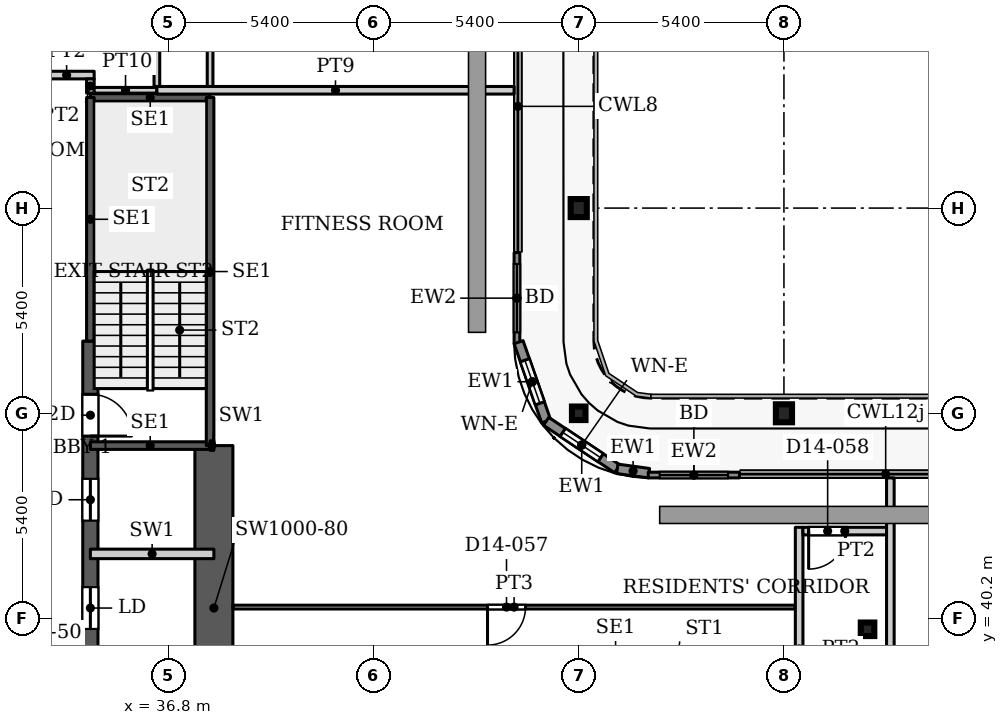
"""IFC4 building model, lengths in metres.
Left out: names, types, materials, properties, quantities, classifications, styles, units other than length and angle.
Written with IfcOpenShell. Run it as: python <this file> out.ifc"""

import sys

from ifc_helpers import new_model, si_unit, direction, frame, frame_2d, origin, origin_2d, place, context, subcontext, project, spatial, rectangle, hollow_rectangle, i_section, extrude, source, transform, mapped, element, fill, save


model = new_model("IFC4")
c1 = context("Model", 3, precision=1e-05, world=origin(), true_north=direction((0.0, 1.0)))
c2 = subcontext(c1, "Body", "Model", "MODEL_VIEW")
j1 = project(units=[si_unit("LENGTHUNIT", "METRE"), si_unit("PLANEANGLEUNIT", "RADIAN")], contexts=[c1])
p1 = place(None, origin())
s1 = spatial("IfcSite", under=j1, at=p1, CompositionType="ELEMENT")
p2 = place(p1, origin())
s2 = spatial("IfcBuilding", under=s1, at=p2, CompositionType="ELEMENT")
p3 = place(p2, frame((0.0, 0.0, 65.6)))
s3 = spatial("IfcBuildingStorey", under=s2, at=p3, CompositionType="ELEMENT", Elevation=65.6)
for number, where, z_axis, x_axis in (
    (1, (53.0, 45.6, 0.0), (0.0, 0.0, 1.0), (1.0, 0.0, 0.0)),
    (2, (47.6, 51.0, 0.0), (0.0, 0.0, 1.0), (1.0, 0.0, 0.0)),
):
    element("IfcColumn", number, at=place(p3, frame(where, z_axis=z_axis, x_axis=x_axis)), inside=s3, PredefinedType="COLUMN", context=c2, shape_type="SweptSolid", body=[
        extrude(i_section(OverallWidth=0.424, OverallDepth=0.474, WebThickness=0.048, FlangeThickness=0.077, FilletRadius=0.014, at=origin_2d()), origin(), (0.0, 0.0, 1.0), 3.9),
    ])
for number, where, z_axis, x_axis in (
    (3, (55.2, 39.916, 0.0), (0.0, 0.0, 1.0), (1.0, 0.0, 0.0)),
    (4, (47.6, 45.6, 0.0), (0.0, 0.0, 1.0), (1.0, 0.0, 0.0)),
):
    element("IfcColumn", number, at=place(p3, frame(where, z_axis=z_axis, x_axis=x_axis)), inside=s3, PredefinedType="COLUMN", context=c2, shape_type="SweptSolid", body=[
        extrude(hollow_rectangle(XDim=0.356, YDim=0.356, WallThickness=0.016, InnerFilletRadius=0.016, OuterFilletRadius=0.032, at=origin_2d()), origin(), (0.0, 0.0, 1.0), 3.9),
    ])
p4 = place(p3, frame((34.75, 29.05, 0.0), z_axis=(0.0, 0.0, 1.0), x_axis=(0.0, 1.0, 0.0)))
e5 = element("IfcWall", 5, at=p4, inside=s3, PredefinedType="SHEAR", context=c2, shape_type="SweptSolid", body=[
    extrude(rectangle(XDim=18.45, YDim=0.4, at=frame_2d((9.225, 0.0))), origin(), (0.0, 0.0, 1.0), 3.9),
])
p5 = place(p4, frame((8.025, 0.0, 0.0)))
e6 = element("IfcOpeningElement", 6, at=p5, cuts=e5, PredefinedType="OPENING", context=c2, shape_type="SweptSolid", body=[
    extrude(rectangle(XDim=1.1, YDim=2.2, at=frame_2d((0.55, 1.1))), frame((0.0, 0.21, 0.0), z_axis=(0.0, -1.0, 0.0), x_axis=(1.0, 0.0, 0.0)), (0.0, 0.0, 1.0), 0.42),
])
p6 = place(p4, frame((10.875, 0.0, 0.0)))
e7 = element("IfcOpeningElement", 7, at=p6, cuts=e5, PredefinedType="OPENING", context=c2, shape_type="SweptSolid", body=[
    extrude(rectangle(XDim=1.1, YDim=2.2, at=frame_2d((0.55, 1.1))), frame((0.0, 0.21, 0.0), z_axis=(0.0, -1.0, 0.0), x_axis=(1.0, 0.0, 0.0)), (0.0, 0.0, 1.0), 0.42),
])
p7 = place(p4, frame((13.725, 0.0, 0.0)))
e8 = element("IfcOpeningElement", 8, at=p7, cuts=e5, PredefinedType="OPENING", context=c2, shape_type="SweptSolid", body=[
    extrude(rectangle(XDim=1.1, YDim=2.2, at=frame_2d((0.55, 1.1))), frame((0.0, 0.21, 0.0), z_axis=(0.0, -1.0, 0.0), x_axis=(1.0, 0.0, 0.0)), (0.0, 0.0, 1.0), 0.42),
])
p8 = place(p4, frame((15.95, 0.0, 0.0)))
e9 = element("IfcOpeningElement", 9, at=p8, cuts=e5, PredefinedType="OPENING", context=c2, shape_type="SweptSolid", body=[
    extrude(rectangle(XDim=1.1, YDim=2.2, at=frame_2d((0.55, 1.1))), frame((0.0, 0.21, 0.0), z_axis=(0.0, -1.0, 0.0), x_axis=(1.0, 0.0, 0.0)), (0.0, 0.0, 1.0), 0.42),
])
p9 = place(p3, frame((38.0, 36.2, 0.0), z_axis=(0.0, 0.0, 1.0), x_axis=(0.0, 1.0, 0.0)))
e10 = element("IfcWall", 10, at=p9, inside=s3, PredefinedType="SHEAR", context=c2, shape_type="SweptSolid", body=[
    extrude(rectangle(XDim=8.55, YDim=1.0, at=frame_2d((4.275, 0.0))), origin(), (0.0, 0.0, 1.0), 3.9),
])
p10 = place(p3, frame((45.975, 49.83, 0.0), z_axis=(0.0, 0.0, 1.0), x_axis=(0.0, -1.0, 0.0)))
e11 = element("IfcWall", 11, at=p10, inside=s3, PredefinedType="SOLIDWALL", context=c2, shape_type="SweptSolid", body=[
    extrude(rectangle(XDim=2.4, YDim=0.15, at=frame_2d((1.2, 0.0))), origin(), (0.0, 0.0, 1.0), 3.75),
])
p11 = place(p10, frame((0.3, 0.0, 0.0)))
e12 = element("IfcOpeningElement", 12, at=p11, cuts=e11, PredefinedType="OPENING", context=c2, shape_type="SweptSolid", body=[
    extrude(rectangle(XDim=1.8, YDim=2.4, at=frame_2d((0.9, 1.2))), frame((0.0, 0.085, 0.0), z_axis=(0.0, -1.0, 0.0), x_axis=(1.0, 0.0, 0.0)), (0.0, 0.0, 1.0), 0.17),
])
p12 = place(p3, frame((46.018, 47.471, 0.0), z_axis=(0.0, 0.0, 1.0), x_axis=(0.328791208903, -0.944402637093, 0.0)))
e13 = element("IfcWall", 13, at=p12, inside=s3, PredefinedType="SOLIDWALL", context=c2, shape_type="SweptSolid", body=[
    extrude(rectangle(XDim=2.205, YDim=0.25, at=frame_2d((1.102, 0.0))), origin(), (0.0, 0.0, 1.0), 3.75),
])
p13 = place(p12, frame((0.503, 0.0, 0.6)))
e14 = element("IfcOpeningElement", 14, at=p13, cuts=e13, PredefinedType="OPENING", context=c2, shape_type="SweptSolid", body=[
    extrude(rectangle(XDim=1.2, YDim=2.1, at=frame_2d((0.6, 1.05))), frame((0.0, 0.135, 0.0), z_axis=(0.0, -1.0, 0.0), x_axis=(1.0, 0.0, 0.0)), (0.0, 0.0, 1.0), 0.27),
])
p14 = place(p3, frame((46.743, 45.389, 0.0), z_axis=(0.0, 0.0, 1.0), x_axis=(0.831449265529, -0.555600682912, 0.0)))
e15 = element("IfcWall", 15, at=p14, inside=s3, PredefinedType="SOLIDWALL", context=c2, shape_type="SweptSolid", body=[
    extrude(rectangle(XDim=2.251, YDim=0.25, at=frame_2d((1.126, 0.0))), origin(), (0.0, 0.0, 1.0), 3.75),
])
p15 = place(p14, frame((0.525, 0.0, 0.6)))
e16 = element("IfcOpeningElement", 16, at=p15, cuts=e15, PredefinedType="OPENING", context=c2, shape_type="SweptSolid", body=[
    extrude(rectangle(XDim=1.2, YDim=2.1, at=frame_2d((0.6, 1.05))), frame((0.0, 0.135, 0.0), z_axis=(0.0, -1.0, 0.0), x_axis=(1.0, 0.0, 0.0)), (0.0, 0.0, 1.0), 0.27),
])
p16 = place(p3, frame((48.615, 44.138, 0.0), z_axis=(0.0, 0.0, 1.0), x_axis=(0.990741504246, -0.135761819977, 0.0)))
e17 = element("IfcWall", 17, at=p16, inside=s3, PredefinedType="SOLIDWALL", context=c2, shape_type="SweptSolid", body=[
    extrude(rectangle(XDim=0.84, YDim=0.25, at=frame_2d((0.42, 0.0))), origin(), (0.0, 0.0, 1.0), 3.75),
])
p17 = place(p3, frame((49.43, 43.975, 0.0), z_axis=(0.0, 0.0, 1.0), x_axis=(1.0, 0.0, 0.0)))
e18 = element("IfcWall", 18, at=p17, inside=s3, PredefinedType="SOLIDWALL", context=c2, shape_type="SweptSolid", body=[
    extrude(rectangle(XDim=2.4, YDim=0.15, at=frame_2d((1.2, 0.0))), origin(), (0.0, 0.0, 1.0), 3.75),
])
p18 = place(p17, frame((0.3, 0.0, 0.0)))
e19 = element("IfcOpeningElement", 19, at=p18, cuts=e18, PredefinedType="OPENING", context=c2, shape_type="SweptSolid", body=[
    extrude(rectangle(XDim=1.8, YDim=2.4, at=frame_2d((0.9, 1.2))), frame((0.0, 0.085, 0.0), z_axis=(0.0, -1.0, 0.0), x_axis=(1.0, 0.0, 0.0)), (0.0, 0.0, 1.0), 0.17),
])
for number, where, z_axis, x_axis in (
    (20, (34.75, 44.75, 0.0), (0.0, 0.0, 1.0), (1.0, 0.0, 0.0)),
    (21, (34.75, 53.91, 0.0), (0.0, 0.0, 1.0), (1.0, 0.0, 0.0)),
):
    element("IfcWall", number, at=place(p3, frame(where, z_axis=z_axis, x_axis=x_axis)), inside=s3, PredefinedType="SHEAR", context=c2, shape_type="SweptSolid", body=[
        extrude(rectangle(XDim=3.15, YDim=0.2, at=frame_2d((1.575, 0.0))), origin(), (0.0, 0.0, 1.0), 3.9),
    ])
p19 = place(p3, frame((34.75, 47.5, 0.0), z_axis=(0.0, 0.0, 1.0), x_axis=(0.0, 1.0, 0.0)))
e22 = element("IfcWall", 22, at=p19, inside=s3, PredefinedType="SHEAR", context=c2, shape_type="SweptSolid", body=[
    extrude(rectangle(XDim=6.41, YDim=0.2, at=frame_2d((3.205, 0.0))), origin(), (0.0, 0.0, 1.0), 3.9),
])
p20 = place(p3, frame((37.9, 44.75, 0.0), z_axis=(0.0, 0.0, 1.0), x_axis=(0.0, 1.0, 0.0)))
e23 = element("IfcWall", 23, at=p20, inside=s3, PredefinedType="SHEAR", context=c2, shape_type="SweptSolid", body=[
    extrude(rectangle(XDim=9.16, YDim=0.2, at=frame_2d((4.58, 0.0))), origin(), (0.0, 0.0, 1.0), 3.9),
])
p21 = place(p3, frame((34.75, 41.9, 0.0), z_axis=(0.0, 0.0, 1.0), x_axis=(1.0, 0.0, 0.0)))
e24 = element("IfcWall", 24, at=p21, inside=s3, PredefinedType="PARTITIONING", context=c2, shape_type="SweptSolid", body=[
    extrude(rectangle(XDim=3.25, YDim=0.25, at=frame_2d((1.625, 0.0))), origin(), (0.0, 0.0, 1.0), 3.9),
])
p22 = place(p3, frame((37.9, 44.75, 0.0), z_axis=(0.0, 0.0, 1.0), x_axis=(1.0, 0.0, 0.0)))
e25 = element("IfcWall", 25, at=p22, inside=s3, PredefinedType="PARTITIONING", context=c2, shape_type="SweptSolid", body=[
    extrude(rectangle(XDim=0.1, YDim=0.25, at=frame_2d((0.05, 0.0))), origin(), (0.0, 0.0, 1.0), 3.9),
])
p23 = place(p3, frame((33.4, 54.5, 0.0), z_axis=(0.0, 0.0, 1.0), x_axis=(1.0, 0.0, 0.0)))
e26 = element("IfcWall", 26, at=p23, inside=s3, PredefinedType="PARTITIONING", context=c2, shape_type="SweptSolid", body=[
    extrude(rectangle(XDim=1.45, YDim=0.2, at=frame_2d((0.725, 0.0))), origin(), (0.0, 0.0, 1.0), 3.6),
])
p24 = place(p3, frame((34.75, 54.025, 0.0), z_axis=(0.0, 0.0, 1.0), x_axis=(0.0, 1.0, 0.0)))
e27 = element("IfcWall", 27, at=p24, inside=s3, PredefinedType="PARTITIONING", context=c2, shape_type="SweptSolid", body=[
    extrude(rectangle(XDim=0.375, YDim=0.2, at=frame_2d((0.188, 0.0))), origin(), (0.0, 0.0, 1.0), 3.6),
])
p25 = place(p3, frame((34.85, 54.1, 0.0), z_axis=(0.0, 0.0, 1.0), x_axis=(1.0, 0.0, 0.0)))
e28 = element("IfcWall", 28, at=p25, inside=s3, PredefinedType="PARTITIONING", context=c2, shape_type="SweptSolid", body=[
    extrude(rectangle(XDim=1.65, YDim=0.15, at=frame_2d((0.825, 0.0))), origin(), (0.0, 0.0, 1.0), 3.6),
])
p26 = place(p3, frame((36.5, 54.1, 0.0), z_axis=(0.0, 0.0, 1.0), x_axis=(1.0, 0.0, 0.0)))
e29 = element("IfcWall", 29, at=p26, inside=s3, PredefinedType="PARTITIONING", context=c2, shape_type="SweptSolid", body=[
    extrude(rectangle(XDim=9.4, YDim=0.2, at=frame_2d((4.7, 0.0))), origin(), (0.0, 0.0, 1.0), 3.6),
])
p27 = place(p3, frame((36.5, 54.2, 0.0), z_axis=(0.0, 0.0, 1.0), x_axis=(0.0, 1.0, 0.0)))
e30 = element("IfcWall", 30, at=p27, inside=s3, PredefinedType="PARTITIONING", context=c2, shape_type="SweptSolid", body=[
    extrude(rectangle(XDim=2.825, YDim=0.15, at=frame_2d((1.413, 0.0))), origin(), (0.0, 0.0, 1.0), 3.6),
])
p28 = place(p27, frame((1.0, 0.0, 0.0)))
e31 = element("IfcOpeningElement", 31, at=p28, cuts=e30, PredefinedType="OPENING", context=c2, shape_type="SweptSolid", body=[
    extrude(rectangle(XDim=0.8, YDim=2.1, at=frame_2d((0.4, 1.05))), frame((0.0, 0.085, 0.0), z_axis=(0.0, -1.0, 0.0), x_axis=(1.0, 0.0, 0.0)), (0.0, 0.0, 1.0), 0.17),
])
p29 = place(p3, frame((37.9, 54.2, 0.0), z_axis=(0.0, 0.0, 1.0), x_axis=(0.0, 1.0, 0.0)))
e32 = element("IfcWall", 32, at=p29, inside=s3, PredefinedType="PARTITIONING", context=c2, shape_type="SweptSolid", body=[
    extrude(rectangle(XDim=25.05, YDim=0.15, at=frame_2d((12.525, 0.0))), origin(), (0.0, 0.0, 1.0), 3.6),
])
p30 = place(p29, frame((5.6, 0.0, 0.0)))
e33 = element("IfcOpeningElement", 33, at=p30, cuts=e32, PredefinedType="OPENING", context=c2, shape_type="SweptSolid", body=[
    extrude(rectangle(XDim=0.9, YDim=2.1, at=frame_2d((0.45, 1.05))), frame((0.0, 0.085, 0.0), z_axis=(0.0, -1.0, 0.0), x_axis=(1.0, 0.0, 0.0)), (0.0, 0.0, 1.0), 0.17),
])
p31 = place(p29, frame((14.9, 0.0, 0.0)))
e34 = element("IfcOpeningElement", 34, at=p31, cuts=e32, PredefinedType="OPENING", context=c2, shape_type="SweptSolid", body=[
    extrude(rectangle(XDim=0.9, YDim=2.1, at=frame_2d((0.45, 1.05))), frame((0.0, 0.085, 0.0), z_axis=(0.0, -1.0, 0.0), x_axis=(1.0, 0.0, 0.0)), (0.0, 0.0, 1.0), 0.17),
])
p32 = place(p29, frame((18.65, 0.0, 0.0)))
e35 = element("IfcOpeningElement", 35, at=p32, cuts=e32, PredefinedType="OPENING", context=c2, shape_type="SweptSolid", body=[
    extrude(rectangle(XDim=0.9, YDim=2.1, at=frame_2d((0.45, 1.05))), frame((0.0, 0.085, 0.0), z_axis=(0.0, -1.0, 0.0), x_axis=(1.0, 0.0, 0.0)), (0.0, 0.0, 1.0), 0.17),
])
p33 = place(p29, frame((22.5, 0.0, 0.0)))
e36 = element("IfcOpeningElement", 36, at=p33, cuts=e32, PredefinedType="OPENING", context=c2, shape_type="SweptSolid", body=[
    extrude(rectangle(XDim=1.0, YDim=2.1, at=frame_2d((0.5, 1.05))), frame((0.0, 0.085, 0.0), z_axis=(0.0, -1.0, 0.0), x_axis=(1.0, 0.0, 0.0)), (0.0, 0.0, 1.0), 0.17),
])
p34 = place(p29, frame((1.2, 0.0, 0.0)))
e37 = element("IfcOpeningElement", 37, at=p34, cuts=e32, PredefinedType="OPENING", context=c2, shape_type="SweptSolid", body=[
    extrude(rectangle(XDim=1.6, YDim=2.1, at=frame_2d((0.8, 1.05))), frame((0.0, 0.085, 0.0), z_axis=(0.0, -1.0, 0.0), x_axis=(1.0, 0.0, 0.0)), (0.0, 0.0, 1.0), 0.17),
])
p35 = place(p29, frame((11.3, 0.0, 0.0)))
e38 = element("IfcOpeningElement", 38, at=p35, cuts=e32, PredefinedType="OPENING", context=c2, shape_type="SweptSolid", body=[
    extrude(rectangle(XDim=0.9, YDim=2.1, at=frame_2d((0.45, 1.05))), frame((0.0, 0.085, 0.0), z_axis=(0.0, -1.0, 0.0), x_axis=(1.0, 0.0, 0.0)), (0.0, 0.0, 1.0), 0.17),
])
p36 = place(p3, frame((38.499, 40.5, 0.0), z_axis=(0.0, 0.0, 1.0), x_axis=(1.0, 0.0, 0.0)))
e39 = element("IfcWall", 39, at=p36, inside=s3, PredefinedType="PARTITIONING", context=c2, shape_type="SweptSolid", body=[
    extrude(rectangle(XDim=14.801, YDim=0.1, at=frame_2d((7.4, 0.0))), origin(), (0.0, 0.0, 1.0), 3.6),
])
p37 = place(p36, frame((6.701, 0.0, 0.0)))
e40 = element("IfcOpeningElement", 40, at=p37, cuts=e39, PredefinedType="OPENING", context=c2, shape_type="SweptSolid", body=[
    extrude(rectangle(XDim=1.0, YDim=2.1, at=frame_2d((0.5, 1.05))), frame((0.0, 0.06, 0.0), z_axis=(0.0, -1.0, 0.0), x_axis=(1.0, 0.0, 0.0)), (0.0, 0.0, 1.0), 0.12),
])
p38 = place(p3, frame((53.4, 36.199, 0.0), z_axis=(0.0, 0.0, 1.0), x_axis=(0.0, 1.0, 0.0)))
e41 = element("IfcWall", 41, at=p38, inside=s3, PredefinedType="PARTITIONING", context=c2, shape_type="SweptSolid", body=[
    extrude(rectangle(XDim=6.401, YDim=0.2, at=frame_2d((3.201, 0.0))), origin(), (0.0, 0.0, 1.0), 3.6),
])
p39 = place(p3, frame((53.5, 42.5, 0.0), z_axis=(0.0, 0.0, 1.0), x_axis=(1.0, 0.0, 0.0)))
e42 = element("IfcWall", 42, at=p39, inside=s3, PredefinedType="PARTITIONING", context=c2, shape_type="SweptSolid", body=[
    extrude(rectangle(XDim=2.2, YDim=0.2, at=frame_2d((1.1, 0.0))), origin(), (0.0, 0.0, 1.0), 3.6),
])
p40 = place(p39, frame((0.15, 0.0, 0.0)))
e43 = element("IfcOpeningElement", 43, at=p40, cuts=e42, PredefinedType="OPENING", context=c2, shape_type="SweptSolid", body=[
    extrude(rectangle(XDim=1.0, YDim=2.1, at=frame_2d((0.5, 1.05))), frame((0.0, 0.11, 0.0), z_axis=(0.0, -1.0, 0.0), x_axis=(1.0, 0.0, 0.0)), (0.0, 0.0, 1.0), 0.22),
])
p41 = place(p3, frame((55.8, 30.4, 0.0), z_axis=(0.0, 0.0, 1.0), x_axis=(0.0, 1.0, 0.0)))
e44 = element("IfcWall", 44, at=p41, inside=s3, PredefinedType="PARTITIONING", context=c2, shape_type="SweptSolid", body=[
    extrude(rectangle(XDim=13.5, YDim=0.2, at=frame_2d((6.75, 0.0))), origin(), (0.0, 0.0, 1.0), 3.6),
])
m1 = source(origin(), c2, "Body", "SweptSolid", [
    extrude(rectangle(XDim=1.8, YDim=2.4, at=frame_2d((0.9, 1.2))), frame((0.0, 0.025, 0.0), z_axis=(0.0, -1.0, 0.0), x_axis=(1.0, 0.0, 0.0)), (0.0, 0.0, 1.0), 0.05),
])
p42 = place(p11, origin())
e45 = element("IfcDoor", 45, at=p42, inside=s3, OperationType="SLIDING_TO_LEFT", PredefinedType="DOOR", context=c2, shape_type="MappedRepresentation", body=[
    mapped(m1, transform((0.0, 0.0, 0.0), x_axis=(1.0, 0.0, 0.0), y_axis=(0.0, 1.0, 0.0), z_axis=(0.0, 0.0, 1.0), scale=1.0)),
])
fill(e12, e45)
m2 = source(origin(), c2, "Body", "SweptSolid", [
    extrude(rectangle(XDim=1.2, YDim=2.1, at=frame_2d((0.6, 1.05))), frame((0.0, 0.03, 0.0), z_axis=(0.0, -1.0, 0.0), x_axis=(1.0, 0.0, 0.0)), (0.0, 0.0, 1.0), 0.06),
])
p43 = place(p13, origin())
e46 = element("IfcWindow", 46, at=p43, inside=s3, PartitioningType="SINGLE_PANEL", PredefinedType="WINDOW", context=c2, shape_type="MappedRepresentation", body=[
    mapped(m2, transform((0.0, 0.0, 0.0), x_axis=(1.0, 0.0, 0.0), y_axis=(0.0, 1.0, 0.0), z_axis=(0.0, 0.0, 1.0), scale=1.0)),
])
fill(e14, e46)
p44 = place(p15, origin())
e47 = element("IfcWindow", 47, at=p44, inside=s3, PartitioningType="SINGLE_PANEL", PredefinedType="WINDOW", context=c2, shape_type="MappedRepresentation", body=[
    mapped(m2, transform((0.0, 0.0, 0.0), x_axis=(1.0, 0.0, 0.0), y_axis=(0.0, 1.0, 0.0), z_axis=(0.0, 0.0, 1.0), scale=1.0)),
])
fill(e16, e47)
p45 = place(p18, origin())
e48 = element("IfcDoor", 48, at=p45, inside=s3, OperationType="SLIDING_TO_LEFT", PredefinedType="DOOR", context=c2, shape_type="MappedRepresentation", body=[
    mapped(m1, transform((0.0, 0.0, 0.0), x_axis=(1.0, 0.0, 0.0), y_axis=(0.0, 1.0, 0.0), z_axis=(0.0, 0.0, 1.0), scale=1.0)),
])
fill(e19, e48)
m3 = source(origin(), c2, "Body", "SweptSolid", [
    extrude(rectangle(XDim=1.1, YDim=2.2, at=frame_2d((0.55, 1.1))), frame((0.0, 0.025, 0.0), z_axis=(0.0, -1.0, 0.0), x_axis=(1.0, 0.0, 0.0)), (0.0, 0.0, 1.0), 0.05),
])
p46 = place(p6, origin())
e49 = element("IfcDoor", 49, at=p46, inside=s3, OperationType="SLIDING_TO_LEFT", PredefinedType="DOOR", context=c2, shape_type="MappedRepresentation", body=[
    mapped(m3, transform((0.0, 0.0, 0.0), x_axis=(1.0, 0.0, 0.0), y_axis=(0.0, 1.0, 0.0), z_axis=(0.0, 0.0, 1.0), scale=1.0)),
])
fill(e7, e49)
p47 = place(p7, origin())
e50 = element("IfcDoor", 50, at=p47, inside=s3, OperationType="SLIDING_TO_LEFT", PredefinedType="DOOR", context=c2, shape_type="MappedRepresentation", body=[
    mapped(m3, transform((0.0, 0.0, 0.0), x_axis=(1.0, 0.0, 0.0), y_axis=(0.0, 1.0, 0.0), z_axis=(0.0, 0.0, 1.0), scale=1.0)),
])
fill(e8, e50)
m4 = source(origin(), c2, "Body", "SweptSolid", [
    extrude(rectangle(XDim=1.1, YDim=2.2, at=frame_2d((0.55, 1.1))), frame((0.0, 0.025, 0.0), z_axis=(0.0, -1.0, 0.0), x_axis=(1.0, 0.0, 0.0)), (0.0, 0.0, 1.0), 0.05),
])
p48 = place(p8, origin())
e51 = element("IfcDoor", 51, at=p48, inside=s3, OperationType="SINGLE_SWING_RIGHT", PredefinedType="DOOR", context=c2, shape_type="MappedRepresentation", body=[
    mapped(m4, transform((0.0, 0.0, 0.0), x_axis=(1.0, 0.0, 0.0), y_axis=(0.0, 1.0, 0.0), z_axis=(0.0, 0.0, 1.0), scale=1.0)),
])
fill(e9, e51)
m5 = source(origin(), c2, "Body", "SweptSolid", [
    extrude(rectangle(XDim=1.0, YDim=2.1, at=frame_2d((0.5, 1.05))), frame((0.0, 0.025, 0.0), z_axis=(0.0, -1.0, 0.0), x_axis=(1.0, 0.0, 0.0)), (0.0, 0.0, 1.0), 0.05),
])
p49 = place(p37, origin())
e52 = element("IfcDoor", 52, at=p49, inside=s3, OperationType="SINGLE_SWING_RIGHT", PredefinedType="DOOR", context=c2, shape_type="MappedRepresentation", body=[
    mapped(m5, transform((0.0, 0.0, 0.0), x_axis=(1.0, 0.0, 0.0), y_axis=(0.0, 1.0, 0.0), z_axis=(0.0, 0.0, 1.0), scale=1.0)),
])
fill(e40, e52)
m6 = source(origin(), c2, "Body", "SweptSolid", [
    extrude(rectangle(XDim=1.0, YDim=2.1, at=frame_2d((0.5, 1.05))), frame((0.0, 0.025, 0.0), z_axis=(0.0, -1.0, 0.0), x_axis=(1.0, 0.0, 0.0)), (0.0, 0.0, 1.0), 0.05),
])
p50 = place(p40, origin())
e53 = element("IfcDoor", 53, at=p50, inside=s3, OperationType="SINGLE_SWING_RIGHT", PredefinedType="DOOR", context=c2, shape_type="MappedRepresentation", body=[
    mapped(m6, transform((0.0, 0.0, 0.0), x_axis=(1.0, 0.0, 0.0), y_axis=(0.0, 1.0, 0.0), z_axis=(0.0, 0.0, 1.0), scale=1.0)),
])
fill(e43, e53)
save(model, sys.argv[1])
